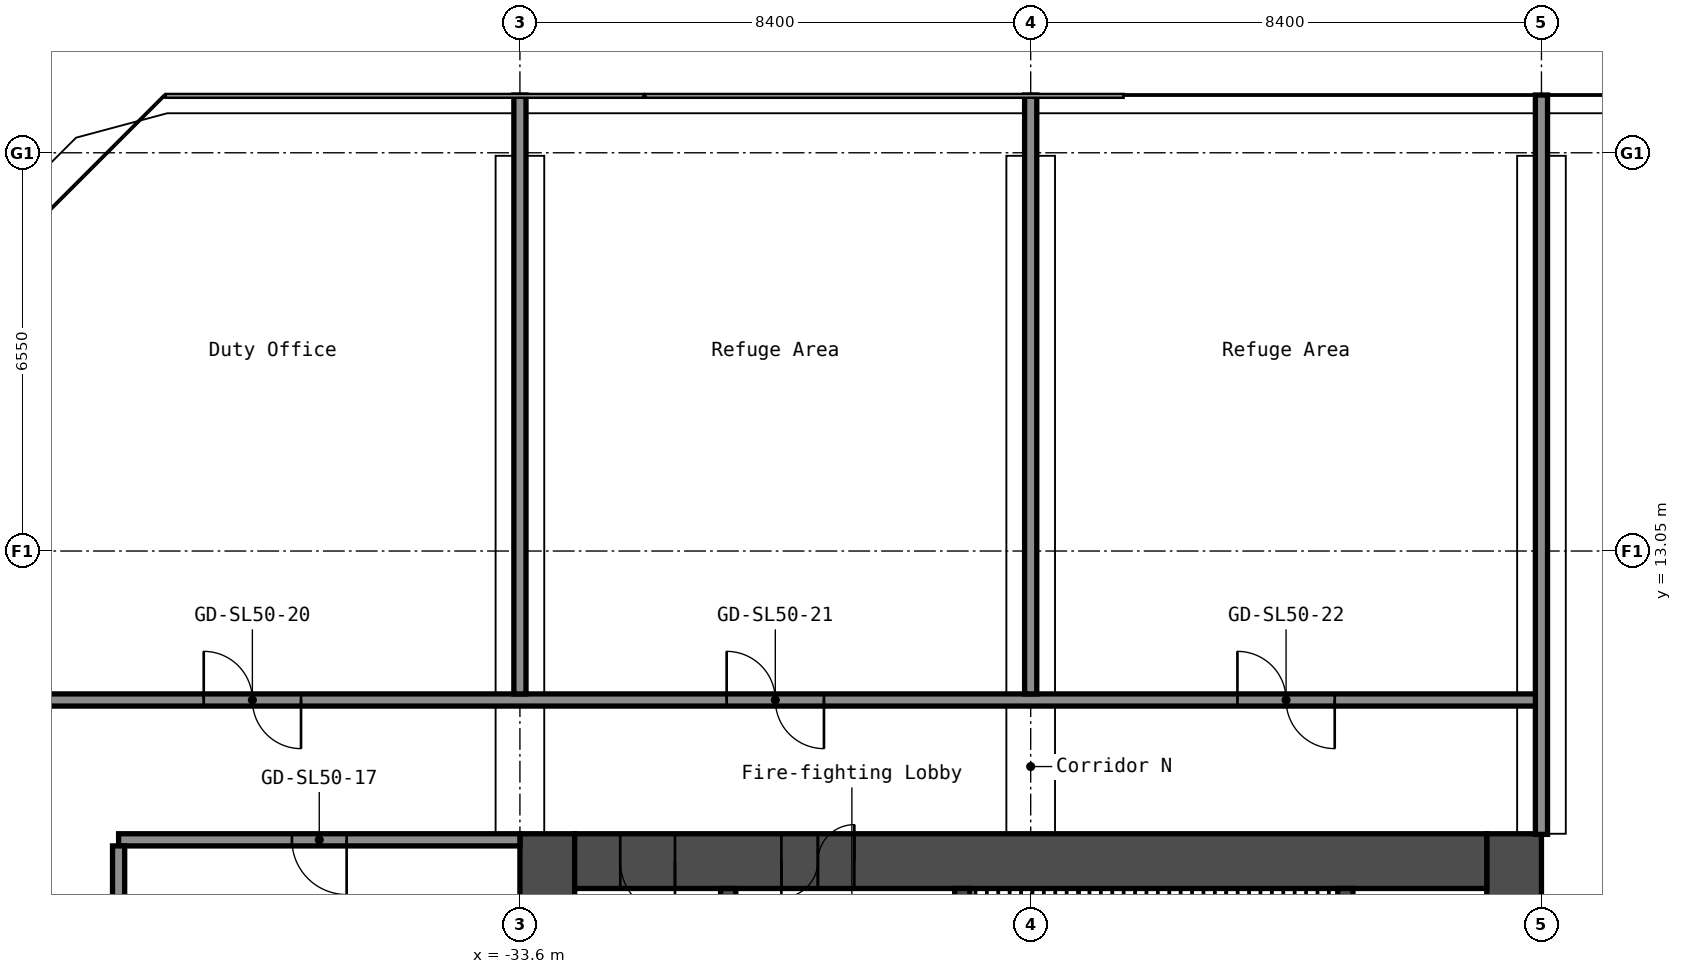
"""IFC4 building model, lengths in metres.
Left out: names, types, materials, properties, quantities, classifications, styles, units other than length and angle.
Written with IfcOpenShell. Run it as: python <this file> out.ifc"""

import sys

from ifc_helpers import new_model, si_unit, direction, frame, frame_2d, origin, place, context, subcontext, project, spatial, rectangle, extrude, element, fill, save


model = new_model("IFC4")
c1 = context("Model", 3, precision=1e-05, world=origin(), true_north=direction((0.0, 1.0)))
c2 = subcontext(c1, "Body", "Model", "MODEL_VIEW")
j1 = project(units=[si_unit("LENGTHUNIT", "METRE"), si_unit("PLANEANGLEUNIT", "RADIAN")], contexts=[c1])
p1 = place(None, origin())
s1 = spatial("IfcSite", under=j1, at=p1, CompositionType="ELEMENT")
p2 = place(p1, origin())
s2 = spatial("IfcBuilding", under=s1, at=p2, CompositionType="ELEMENT")
p3 = place(p2, frame((0.0, 0.0, 175.8)))
s3 = spatial("IfcBuildingStorey", under=s2, at=p3, CompositionType="ELEMENT", Elevation=175.8)
p4 = place(p3, frame((-17.25, -8.4, 0.0), z_axis=(0.0, 0.0, 1.0), x_axis=(0.0, 1.0, 0.0)))
e1 = element("IfcWall", 1, at=p4, inside=s3, PredefinedType="SHEAR", context=c2, shape_type="SweptSolid", body=[
    extrude(rectangle(XDim=16.8, YDim=0.9, at=frame_2d((8.4, 0.0))), origin(), (0.0, 0.0, 1.0), 4.1),
])
p5 = place(p4, frame((10.1, 0.0, 0.0)))
e2 = element("IfcOpeningElement", 2, at=p5, cuts=e1, PredefinedType="OPENING", context=c2, shape_type="SweptSolid", body=[
    extrude(rectangle(XDim=1.6, YDim=2.1, at=frame_2d((0.8, 1.05))), frame((0.0, 0.46, 0.0), z_axis=(0.0, -1.0, 0.0), x_axis=(1.0, 0.0, 0.0)), (0.0, 0.0, 1.0), 0.92),
])
p6 = place(p3, frame((-33.15, -8.4, 0.0), z_axis=(0.0, 0.0, 1.0), x_axis=(0.0, 1.0, 0.0)))
e3 = element("IfcWall", 3, at=p6, inside=s3, PredefinedType="SHEAR", context=c2, shape_type="SweptSolid", body=[
    extrude(rectangle(XDim=16.8, YDim=0.9, at=frame_2d((8.4, 0.0))), origin(), (0.0, 0.0, 1.0), 4.1),
])
p7 = place(p3, frame((-32.7, 7.95, 0.0), z_axis=(0.0, 0.0, 1.0), x_axis=(1.0, 0.0, 0.0)))
e4 = element("IfcWall", 4, at=p7, inside=s3, PredefinedType="SHEAR", context=c2, shape_type="SweptSolid", body=[
    extrude(rectangle(XDim=15.0, YDim=0.9, at=frame_2d((7.5, 0.0))), origin(), (0.0, 0.0, 1.0), 4.1),
])
p8 = place(p7, frame((3.4, 0.0, 0.0)))
e5 = element("IfcOpeningElement", 5, at=p8, cuts=e4, PredefinedType="OPENING", context=c2, shape_type="SweptSolid", body=[
    extrude(rectangle(XDim=1.2, YDim=2.1, at=frame_2d((0.6, 1.05))), frame((0.0, 0.46, 0.0), z_axis=(0.0, -1.0, 0.0), x_axis=(1.0, 0.0, 0.0)), (0.0, 0.0, 1.0), 0.92),
])
p9 = place(p7, frame((0.75, 0.0, 0.0)))
e6 = element("IfcOpeningElement", 6, at=p9, cuts=e4, PredefinedType="OPENING", context=c2, shape_type="SweptSolid", body=[
    extrude(rectangle(XDim=0.9, YDim=2.1, at=frame_2d((0.45, 1.05))), frame((0.0, 0.46, 0.0), z_axis=(0.0, -1.0, 0.0), x_axis=(1.0, 0.0, 0.0)), (0.0, 0.0, 1.0), 0.92),
])
p10 = place(p3, frame((-20.025, 1.2, 0.0), z_axis=(0.0, 0.0, 1.0), x_axis=(0.0, 1.0, 0.0)))
e7 = element("IfcWall", 7, at=p10, inside=s3, PredefinedType="SHEAR", context=c2, shape_type="SweptSolid", body=[
    extrude(rectangle(XDim=6.3, YDim=0.25, at=frame_2d((3.15, 0.0))), origin(), (0.0, 0.0, 1.0), 4.1),
])
p11 = place(p3, frame((-26.325, 3.75, 0.0), z_axis=(0.0, 0.0, 1.0), x_axis=(0.0, 1.0, 0.0)))
e8 = element("IfcWall", 8, at=p11, inside=s3, PredefinedType="SHEAR", context=c2, shape_type="SweptSolid", body=[
    extrude(rectangle(XDim=3.75, YDim=0.25, at=frame_2d((1.875, 0.0))), origin(), (0.0, 0.0, 1.0), 4.1),
])
p12 = place(p11, frame((1.25, 0.0, 0.0)))
e9 = element("IfcOpeningElement", 9, at=p12, cuts=e8, PredefinedType="OPENING", context=c2, shape_type="SweptSolid", body=[
    extrude(rectangle(XDim=1.2, YDim=2.1, at=frame_2d((0.6, 1.05))), frame((0.0, 0.135, 0.0), z_axis=(0.0, -1.0, 0.0), x_axis=(1.0, 0.0, 0.0)), (0.0, 0.0, 1.0), 0.27),
])
p13 = place(p3, frame((-30.175, 1.45, 0.0), z_axis=(0.0, 0.0, 1.0), x_axis=(0.0, 1.0, 0.0)))
e10 = element("IfcWall", 10, at=p13, inside=s3, PredefinedType="SHEAR", context=c2, shape_type="SweptSolid", body=[
    extrude(rectangle(XDim=6.05, YDim=0.25, at=frame_2d((3.025, 0.0))), origin(), (0.0, 0.0, 1.0), 4.1),
])
p14 = place(p13, frame((2.625, 0.0, 0.0)))
e11 = element("IfcOpeningElement", 11, at=p14, cuts=e10, PredefinedType="OPENING", context=c2, shape_type="SweptSolid", body=[
    extrude(rectangle(XDim=1.1, YDim=2.1, at=frame_2d((0.55, 1.05))), frame((0.0, 0.135, 0.0), z_axis=(0.0, -1.0, 0.0), x_axis=(1.0, 0.0, 0.0)), (0.0, 0.0, 1.0), 0.27),
])
p15 = place(p3, frame((-40.2, 8.3, 0.0), z_axis=(0.0, 0.0, 1.0), x_axis=(1.0, 0.0, 0.0)))
e12 = element("IfcWall", 12, at=p15, inside=s3, PredefinedType="PARTITIONING", context=c2, shape_type="SweptSolid", body=[
    extrude(rectangle(XDim=6.6, YDim=0.2, at=frame_2d((3.3, 0.0))), origin(), (0.0, 0.0, 1.0), 4.1),
])
p16 = place(p15, frame((2.85, 0.0, 0.0)))
e13 = element("IfcOpeningElement", 13, at=p16, cuts=e12, PredefinedType="OPENING", context=c2, shape_type="SweptSolid", body=[
    extrude(rectangle(XDim=0.9, YDim=2.1, at=frame_2d((0.45, 1.05))), frame((0.0, 0.11, 0.0), z_axis=(0.0, -1.0, 0.0), x_axis=(1.0, 0.0, 0.0)), (0.0, 0.0, 1.0), 0.22),
])
p17 = place(p3, frame((-42.7, 10.6, 0.0), z_axis=(0.0, 0.0, 1.0), x_axis=(1.0, 0.0, 0.0)))
e14 = element("IfcWall", 14, at=p17, inside=s3, PredefinedType="PARTITIONING", context=c2, shape_type="SweptSolid", body=[
    extrude(rectangle(XDim=25.9, YDim=0.2, at=frame_2d((12.95, 0.0))), origin(), (0.0, 0.0, 1.0), 4.1),
])
p18 = place(p17, frame((3.9, 0.0, 0.0)))
e15 = element("IfcOpeningElement", 15, at=p18, cuts=e14, PredefinedType="OPENING", context=c2, shape_type="SweptSolid", body=[
    extrude(rectangle(XDim=1.6, YDim=2.1, at=frame_2d((0.8, 1.05))), frame((0.0, 0.11, 0.0), z_axis=(0.0, -1.0, 0.0), x_axis=(1.0, 0.0, 0.0)), (0.0, 0.0, 1.0), 0.22),
])
p19 = place(p17, frame((12.5, 0.0, 0.0)))
e16 = element("IfcOpeningElement", 16, at=p19, cuts=e14, PredefinedType="OPENING", context=c2, shape_type="SweptSolid", body=[
    extrude(rectangle(XDim=1.6, YDim=2.1, at=frame_2d((0.8, 1.05))), frame((0.0, 0.11, 0.0), z_axis=(0.0, -1.0, 0.0), x_axis=(1.0, 0.0, 0.0)), (0.0, 0.0, 1.0), 0.22),
])
p20 = place(p17, frame((20.9, 0.0, 0.0)))
e17 = element("IfcOpeningElement", 17, at=p20, cuts=e14, PredefinedType="OPENING", context=c2, shape_type="SweptSolid", body=[
    extrude(rectangle(XDim=1.6, YDim=2.1, at=frame_2d((0.8, 1.05))), frame((0.0, 0.11, 0.0), z_axis=(0.0, -1.0, 0.0), x_axis=(1.0, 0.0, 0.0)), (0.0, 0.0, 1.0), 0.22),
])
p21 = place(p3, frame((-40.2, -8.2, 0.0), z_axis=(0.0, 0.0, 1.0), x_axis=(0.0, 1.0, 0.0)))
e18 = element("IfcWall", 18, at=p21, inside=s3, PredefinedType="PARTITIONING", context=c2, shape_type="SweptSolid", body=[
    extrude(rectangle(XDim=16.4, YDim=0.2, at=frame_2d((8.2, 0.0))), origin(), (0.0, 0.0, 1.0), 4.1),
])
for number, where, z_axis, x_axis in (
    (19, (-33.6, 10.7, 0.0), (0.0, 0.0, 1.0), (0.0, 1.0, 0.0)),
    (20, (-25.2, 10.7, 0.0), (0.0, 0.0, 1.0), (0.0, 1.0, 0.0)),
):
    element("IfcWall", number, at=place(p3, frame(where, z_axis=z_axis, x_axis=x_axis)), inside=s3, PredefinedType="PARTITIONING", context=c2, shape_type="SweptSolid", body=[
        extrude(rectangle(XDim=9.85, YDim=0.2, at=frame_2d((4.925, 0.0))), origin(), (0.0, 0.0, 1.0), 4.1),
    ])
p22 = place(p3, frame((-16.8, 8.39, 0.0), z_axis=(0.0, 0.0, 1.0), x_axis=(0.0, 1.0, 0.0)))
e21 = element("IfcWall", 21, at=p22, inside=s3, PredefinedType="PARTITIONING", context=c2, shape_type="SweptSolid", body=[
    extrude(rectangle(XDim=12.16, YDim=0.2, at=frame_2d((6.08, 0.0))), origin(), (0.0, 0.0, 1.0), 4.1),
])
p23 = place(p8, origin())
e22 = element("IfcDoor", 22, at=p23, inside=s3, OperationType="DOUBLE_DOOR_SINGLE_SWING", PredefinedType="DOOR", context=c2, shape_type="SweptSolid", body=[
    extrude(rectangle(XDim=1.2, YDim=2.1, at=frame_2d((0.6, 1.05))), frame((0.0, 0.025, 0.0), z_axis=(0.0, -1.0, 0.0), x_axis=(1.0, 0.0, 0.0)), (0.0, 0.0, 1.0), 0.05),
])
fill(e5, e22)
p24 = place(p9, origin())
e23 = element("IfcDoor", 23, at=p24, inside=s3, OperationType="SINGLE_SWING_RIGHT", PredefinedType="DOOR", context=c2, shape_type="SweptSolid", body=[
    extrude(rectangle(XDim=0.9, YDim=2.1, at=frame_2d((0.45, 1.05))), frame((0.0, 0.025, 0.0), z_axis=(0.0, -1.0, 0.0), x_axis=(1.0, 0.0, 0.0)), (0.0, 0.0, 1.0), 0.05),
])
fill(e6, e23)
p25 = place(p16, origin())
e24 = element("IfcDoor", 24, at=p25, inside=s3, OperationType="SINGLE_SWING_RIGHT", PredefinedType="DOOR", context=c2, shape_type="SweptSolid", body=[
    extrude(rectangle(XDim=0.9, YDim=2.1, at=frame_2d((0.45, 1.05))), frame((0.0, 0.025, 0.0), z_axis=(0.0, -1.0, 0.0), x_axis=(1.0, 0.0, 0.0)), (0.0, 0.0, 1.0), 0.05),
])
fill(e13, e24)
p26 = place(p18, origin())
e25 = element("IfcDoor", 25, at=p26, inside=s3, OperationType="DOUBLE_DOOR_SINGLE_SWING", PredefinedType="DOOR", context=c2, shape_type="SweptSolid", body=[
    extrude(rectangle(XDim=1.6, YDim=2.1, at=frame_2d((0.8, 1.05))), frame((0.0, 0.025, 0.0), z_axis=(0.0, -1.0, 0.0), x_axis=(1.0, 0.0, 0.0)), (0.0, 0.0, 1.0), 0.05),
])
fill(e15, e25)
p27 = place(p19, origin())
e26 = element("IfcDoor", 26, at=p27, inside=s3, OperationType="DOUBLE_DOOR_SINGLE_SWING", PredefinedType="DOOR", context=c2, shape_type="SweptSolid", body=[
    extrude(rectangle(XDim=1.6, YDim=2.1, at=frame_2d((0.8, 1.05))), frame((0.0, 0.025, 0.0), z_axis=(0.0, -1.0, 0.0), x_axis=(1.0, 0.0, 0.0)), (0.0, 0.0, 1.0), 0.05),
])
fill(e16, e26)
p28 = place(p20, origin())
e27 = element("IfcDoor", 27, at=p28, inside=s3, OperationType="DOUBLE_DOOR_SINGLE_SWING", PredefinedType="DOOR", context=c2, shape_type="SweptSolid", body=[
    extrude(rectangle(XDim=1.6, YDim=2.1, at=frame_2d((0.8, 1.05))), frame((0.0, 0.025, 0.0), z_axis=(0.0, -1.0, 0.0), x_axis=(1.0, 0.0, 0.0)), (0.0, 0.0, 1.0), 0.05),
])
fill(e17, e27)
save(model, sys.argv[1])
